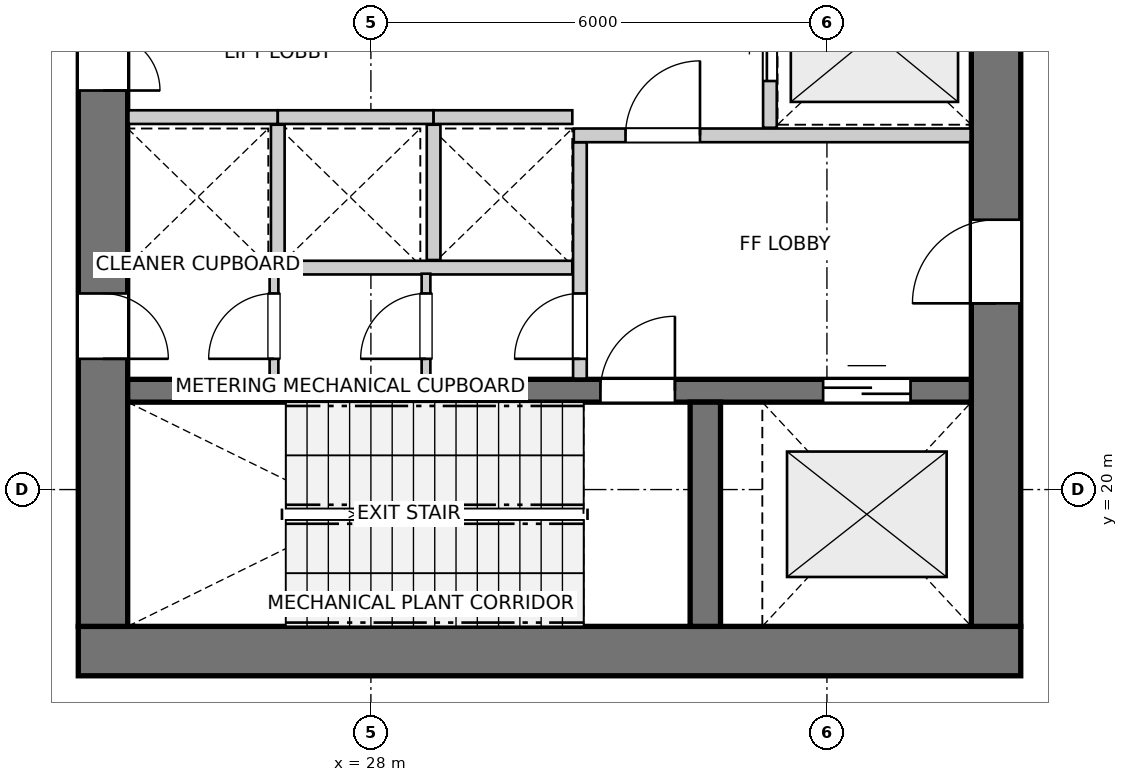
"""IFC4 building model, lengths in metres.
Left out: names, types, materials, properties, quantities, classifications, styles, units other than length and angle.
Written with IfcOpenShell. Run it as: python <this file> out.ifc"""

import sys

from ifc_helpers import new_model, si_unit, direction, frame, frame_2d, origin, place, context, subcontext, project, spatial, rectangle, extrude, source, transform, mapped, element, fill, save


model = new_model("IFC4")
c1 = context("Model", 3, precision=1e-05, world=origin(), true_north=direction((0.0, 1.0)))
c2 = subcontext(c1, "Body", "Model", "MODEL_VIEW")
j1 = project(units=[si_unit("LENGTHUNIT", "METRE"), si_unit("PLANEANGLEUNIT", "RADIAN")], contexts=[c1])
p1 = place(None, origin())
s1 = spatial("IfcSite", under=j1, at=p1, CompositionType="ELEMENT")
p2 = place(p1, origin())
s2 = spatial("IfcBuilding", under=s1, at=p2, CompositionType="ELEMENT")
p3 = place(p2, frame((0.0, 0.0, 128.0)))
s3 = spatial("IfcBuildingStorey", under=s2, at=p3, CompositionType="ELEMENT", Elevation=128.0)
p4 = place(p3, frame((24.15, 17.875, 0.0), z_axis=(0.0, 0.0, 1.0), x_axis=(1.0, 0.0, 0.0)))
e1 = element("IfcWall", 1, at=p4, inside=s3, PredefinedType="SHEAR", context=c2, shape_type="SweptSolid", body=[
    extrude(rectangle(XDim=12.4, YDim=0.65, at=frame_2d((6.2, 0.0))), origin(), (0.0, 0.0, 1.0), 4.75),
])
p5 = place(p3, frame((24.475, 33.8, 0.0), z_axis=(0.0, 0.0, 1.0), x_axis=(0.0, -1.0, 0.0)))
e2 = element("IfcWall", 2, at=p5, inside=s3, PredefinedType="SHEAR", context=c2, shape_type="SweptSolid", body=[
    extrude(rectangle(XDim=15.6, YDim=0.65, at=frame_2d((7.8, 0.0))), origin(), (0.0, 0.0, 1.0), 4.75),
])
p6 = place(p5, frame((7.05, 0.0, 0.0)))
e3 = element("IfcOpeningElement", 3, at=p6, cuts=e2, PredefinedType="OPENING", context=c2, shape_type="SweptSolid", body=[
    extrude(rectangle(XDim=1.5, YDim=2.15, at=frame_2d((0.75, 1.075))), frame((0.0, 0.335, 0.0), z_axis=(0.0, -1.0, 0.0), x_axis=(1.0, 0.0, 0.0)), (0.0, 0.0, 1.0), 0.67),
])
p7 = place(p5, frame((3.52, 0.0, 0.0)))
e4 = element("IfcOpeningElement", 4, at=p7, cuts=e2, PredefinedType="OPENING", context=c2, shape_type="SweptSolid", body=[
    extrude(rectangle(XDim=0.86, YDim=2.05, at=frame_2d((0.43, 1.025))), frame((0.0, 0.335, 0.0), z_axis=(0.0, -1.0, 0.0), x_axis=(1.0, 0.0, 0.0)), (0.0, 0.0, 1.0), 0.67),
])
p8 = place(p5, frame((11.22, 0.0, 0.0)))
e5 = element("IfcOpeningElement", 5, at=p8, cuts=e2, PredefinedType="OPENING", context=c2, shape_type="SweptSolid", body=[
    extrude(rectangle(XDim=0.86, YDim=2.05, at=frame_2d((0.43, 1.025))), frame((0.0, 0.335, 0.0), z_axis=(0.0, -1.0, 0.0), x_axis=(1.0, 0.0, 0.0)), (0.0, 0.0, 1.0), 0.67),
])
p9 = place(p3, frame((36.225, 18.2, 0.0), z_axis=(0.0, 0.0, 1.0), x_axis=(0.0, 1.0, 0.0)))
e6 = element("IfcWall", 6, at=p9, inside=s3, PredefinedType="SHEAR", context=c2, shape_type="SweptSolid", body=[
    extrude(rectangle(XDim=15.6, YDim=0.65, at=frame_2d((7.8, 0.0))), origin(), (0.0, 0.0, 1.0), 4.75),
])
p10 = place(p9, frame((4.25, 0.0, 0.0)))
e7 = element("IfcOpeningElement", 7, at=p10, cuts=e6, PredefinedType="OPENING", context=c2, shape_type="SweptSolid", body=[
    extrude(rectangle(XDim=1.1, YDim=2.15, at=frame_2d((0.55, 1.075))), frame((0.0, 0.335, 0.0), z_axis=(0.0, -1.0, 0.0), x_axis=(1.0, 0.0, 0.0)), (0.0, 0.0, 1.0), 0.67),
])
p11 = place(p9, frame((10.25, 0.0, 0.0)))
e8 = element("IfcOpeningElement", 8, at=p11, cuts=e6, PredefinedType="OPENING", context=c2, shape_type="SweptSolid", body=[
    extrude(rectangle(XDim=1.1, YDim=2.15, at=frame_2d((0.55, 1.075))), frame((0.0, 0.335, 0.0), z_axis=(0.0, -1.0, 0.0), x_axis=(1.0, 0.0, 0.0)), (0.0, 0.0, 1.0), 0.67),
])
p12 = place(p3, frame((24.8, 21.3, 0.0), z_axis=(0.0, 0.0, 1.0), x_axis=(1.0, 0.0, 0.0)))
e9 = element("IfcWall", 9, at=p12, inside=s3, PredefinedType="SHEAR", context=c2, shape_type="SweptSolid", body=[
    extrude(rectangle(XDim=11.1, YDim=0.3, at=frame_2d((5.55, 0.0))), origin(), (0.0, 0.0, 1.0), 4.75),
])
p13 = place(p12, frame((6.22, 0.0, 0.0)))
e10 = element("IfcOpeningElement", 10, at=p13, cuts=e9, PredefinedType="OPENING", context=c2, shape_type="SweptSolid", body=[
    extrude(rectangle(XDim=0.98, YDim=2.15, at=frame_2d((0.49, 1.075))), frame((0.0, 0.16, 0.0), z_axis=(0.0, -1.0, 0.0), x_axis=(1.0, 0.0, 0.0)), (0.0, 0.0, 1.0), 0.32),
])
p14 = place(p12, frame((9.15, 0.0, 0.0)))
e11 = element("IfcOpeningElement", 11, at=p14, cuts=e9, PredefinedType="OPENING", context=c2, shape_type="SweptSolid", body=[
    extrude(rectangle(XDim=1.15, YDim=2.15, at=frame_2d((0.575, 1.075))), frame((0.0, 0.16, 0.0), z_axis=(0.0, -1.0, 0.0), x_axis=(1.0, 0.0, 0.0)), (0.0, 0.0, 1.0), 0.32),
])
p15 = place(p3, frame((32.4, 18.2, 0.0), z_axis=(0.0, 0.0, 1.0), x_axis=(0.0, 1.0, 0.0)))
e12 = element("IfcWall", 12, at=p15, inside=s3, PredefinedType="SHEAR", context=c2, shape_type="SweptSolid", body=[
    extrude(rectangle(XDim=2.95, YDim=0.4, at=frame_2d((1.475, 0.0))), origin(), (0.0, 0.0, 1.0), 4.75),
])
p16 = place(p3, frame((30.75, 21.46, 0.0), z_axis=(0.0, 0.0, 1.0), x_axis=(0.0, 1.0, 0.0)))
e13 = element("IfcWall", 13, at=p16, inside=s3, PredefinedType="PARTITIONING", context=c2, shape_type="SweptSolid", body=[
    extrude(rectangle(XDim=3.11, YDim=0.18, at=frame_2d((1.555, 0.0))), origin(), (0.0, 0.0, 1.0), 4.75),
])
p17 = place(p16, frame((0.26, 0.0, 0.0)))
e14 = element("IfcOpeningElement", 14, at=p17, cuts=e13, PredefinedType="OPENING", context=c2, shape_type="SweptSolid", body=[
    extrude(rectangle(XDim=0.86, YDim=2.05, at=frame_2d((0.43, 1.025))), frame((0.0, 0.1, 0.0), z_axis=(0.0, -1.0, 0.0), x_axis=(1.0, 0.0, 0.0)), (0.0, 0.0, 1.0), 0.2),
])
p18 = place(p3, frame((30.67, 24.66, 0.0), z_axis=(0.0, 0.0, 1.0), x_axis=(1.0, 0.0, 0.0)))
e15 = element("IfcWall", 15, at=p18, inside=s3, PredefinedType="PARTITIONING", context=c2, shape_type="SweptSolid", body=[
    extrude(rectangle(XDim=5.22, YDim=0.18, at=frame_2d((2.61, 0.0))), origin(), (0.0, 0.0, 1.0), 4.75),
])
p19 = place(p18, frame((0.68, 0.0, 0.0)))
e16 = element("IfcOpeningElement", 16, at=p19, cuts=e15, PredefinedType="OPENING", context=c2, shape_type="SweptSolid", body=[
    extrude(rectangle(XDim=0.98, YDim=2.15, at=frame_2d((0.49, 1.075))), frame((0.0, 0.1, 0.0), z_axis=(0.0, -1.0, 0.0), x_axis=(1.0, 0.0, 0.0)), (0.0, 0.0, 1.0), 0.2),
])
p20 = place(p3, frame((33.25, 24.76, 0.0), z_axis=(0.0, 0.0, 1.0), x_axis=(0.0, 1.0, 0.0)))
e17 = element("IfcWall", 17, at=p20, inside=s3, PredefinedType="PARTITIONING", context=c2, shape_type="SweptSolid", body=[
    extrude(rectangle(XDim=2.48, YDim=0.18, at=frame_2d((1.24, 0.0))), origin(), (0.0, 0.0, 1.0), 4.75),
])
p21 = place(p20, frame((0.615, 0.0, 0.0)))
e18 = element("IfcOpeningElement", 18, at=p21, cuts=e17, PredefinedType="OPENING", context=c2, shape_type="SweptSolid", body=[
    extrude(rectangle(XDim=1.25, YDim=2.15, at=frame_2d((0.625, 1.075))), frame((0.0, 0.1, 0.0), z_axis=(0.0, -1.0, 0.0), x_axis=(1.0, 0.0, 0.0)), (0.0, 0.0, 1.0), 0.2),
])
p22 = place(p3, frame((24.81, 22.92, 0.0), z_axis=(0.0, 0.0, 1.0), x_axis=(1.0, 0.0, 0.0)))
e19 = element("IfcWall", 19, at=p22, inside=s3, PredefinedType="PARTITIONING", context=c2, shape_type="SweptSolid", body=[
    extrude(rectangle(XDim=5.84, YDim=0.18, at=frame_2d((2.92, 0.0))), origin(), (0.0, 0.0, 1.0), 4.75),
])
p23 = place(p3, frame((24.81, 24.9, 0.0), z_axis=(0.0, 0.0, 1.0), x_axis=(1.0, 0.0, 0.0)))
e20 = element("IfcWall", 20, at=p23, inside=s3, PredefinedType="PARTITIONING", context=c2, shape_type="SweptSolid", body=[
    extrude(rectangle(XDim=1.965, YDim=0.18, at=frame_2d((0.982, 0.0))), origin(), (0.0, 0.0, 1.0), 4.75),
])
p24 = place(p3, frame((26.775, 24.9, 0.0), z_axis=(0.0, 0.0, 1.0), x_axis=(1.0, 0.0, 0.0)))
e21 = element("IfcWall", 21, at=p24, inside=s3, PredefinedType="PARTITIONING", context=c2, shape_type="SweptSolid", body=[
    extrude(rectangle(XDim=2.05, YDim=0.18, at=frame_2d((1.025, 0.0))), origin(), (0.0, 0.0, 1.0), 4.75),
])
p25 = place(p3, frame((26.775, 23.02, 0.0), z_axis=(0.0, 0.0, 1.0), x_axis=(0.0, 1.0, 0.0)))
e22 = element("IfcWall", 22, at=p25, inside=s3, PredefinedType="PARTITIONING", context=c2, shape_type="SweptSolid", body=[
    extrude(rectangle(XDim=1.78, YDim=0.18, at=frame_2d((0.89, 0.0))), origin(), (0.0, 0.0, 1.0), 4.75),
])
p26 = place(p3, frame((28.825, 24.9, 0.0), z_axis=(0.0, 0.0, 1.0), x_axis=(1.0, 0.0, 0.0)))
e23 = element("IfcWall", 23, at=p26, inside=s3, PredefinedType="PARTITIONING", context=c2, shape_type="SweptSolid", body=[
    extrude(rectangle(XDim=1.825, YDim=0.18, at=frame_2d((0.913, 0.0))), origin(), (0.0, 0.0, 1.0), 4.75),
])
p27 = place(p3, frame((28.825, 23.02, 0.0), z_axis=(0.0, 0.0, 1.0), x_axis=(0.0, 1.0, 0.0)))
e24 = element("IfcWall", 24, at=p27, inside=s3, PredefinedType="PARTITIONING", context=c2, shape_type="SweptSolid", body=[
    extrude(rectangle(XDim=1.78, YDim=0.18, at=frame_2d((0.89, 0.0))), origin(), (0.0, 0.0, 1.0), 4.75),
])
p28 = place(p3, frame((26.725, 21.46, 0.0), z_axis=(0.0, 0.0, 1.0), x_axis=(0.0, 1.0, 0.0)))
e25 = element("IfcWall", 25, at=p28, inside=s3, PredefinedType="PARTITIONING", context=c2, shape_type="SweptSolid", body=[
    extrude(rectangle(XDim=1.38, YDim=0.115, at=frame_2d((0.69, 0.0))), origin(), (0.0, 0.0, 1.0), 4.75),
])
p29 = place(p28, frame((0.26, 0.0, 0.0)))
e26 = element("IfcOpeningElement", 26, at=p29, cuts=e25, PredefinedType="OPENING", context=c2, shape_type="SweptSolid", body=[
    extrude(rectangle(XDim=0.86, YDim=2.05, at=frame_2d((0.43, 1.025))), frame((0.0, 0.067, 0.0), z_axis=(0.0, -1.0, 0.0), x_axis=(1.0, 0.0, 0.0)), (0.0, 0.0, 1.0), 0.135),
])
p30 = place(p3, frame((28.725, 21.46, 0.0), z_axis=(0.0, 0.0, 1.0), x_axis=(0.0, 1.0, 0.0)))
e27 = element("IfcWall", 27, at=p30, inside=s3, PredefinedType="PARTITIONING", context=c2, shape_type="SweptSolid", body=[
    extrude(rectangle(XDim=1.38, YDim=0.115, at=frame_2d((0.69, 0.0))), origin(), (0.0, 0.0, 1.0), 4.75),
])
p31 = place(p30, frame((0.26, 0.0, 0.0)))
e28 = element("IfcOpeningElement", 28, at=p31, cuts=e27, PredefinedType="OPENING", context=c2, shape_type="SweptSolid", body=[
    extrude(rectangle(XDim=0.86, YDim=2.05, at=frame_2d((0.43, 1.025))), frame((0.0, 0.067, 0.0), z_axis=(0.0, -1.0, 0.0), x_axis=(1.0, 0.0, 0.0)), (0.0, 0.0, 1.0), 0.135),
])
m1 = source(origin(), c2, "Body", "SweptSolid", [
    extrude(rectangle(XDim=0.98, YDim=2.15, at=frame_2d((0.49, 1.075))), frame((0.0, 0.025, 0.0), z_axis=(0.0, -1.0, 0.0), x_axis=(1.0, 0.0, 0.0)), (0.0, 0.0, 1.0), 0.05),
])
p32 = place(p13, origin())
e29 = element("IfcDoor", 29, at=p32, inside=s3, OperationType="SINGLE_SWING_RIGHT", PredefinedType="DOOR", context=c2, shape_type="MappedRepresentation", body=[
    mapped(m1, transform((0.0, 0.0, 0.0), x_axis=(1.0, 0.0, 0.0), y_axis=(0.0, 1.0, 0.0), z_axis=(0.0, 0.0, 1.0), scale=1.0)),
])
fill(e10, e29)
m2 = source(origin(), c2, "Body", "SweptSolid", [
    extrude(rectangle(XDim=1.15, YDim=2.15, at=frame_2d((0.575, 1.075))), frame((0.0, 0.025, 0.0), z_axis=(0.0, -1.0, 0.0), x_axis=(1.0, 0.0, 0.0)), (0.0, 0.0, 1.0), 0.05),
])
p33 = place(p14, origin())
e30 = element("IfcDoor", 30, at=p33, inside=s3, OperationType="DOUBLE_DOOR_SLIDING", PredefinedType="DOOR", context=c2, shape_type="MappedRepresentation", body=[
    mapped(m2, transform((0.0, 0.0, 0.0), x_axis=(1.0, 0.0, 0.0), y_axis=(0.0, 1.0, 0.0), z_axis=(0.0, 0.0, 1.0), scale=1.0)),
])
fill(e11, e30)
m3 = source(origin(), c2, "Body", "SweptSolid", [
    extrude(rectangle(XDim=1.1, YDim=2.15, at=frame_2d((0.55, 1.075))), frame((0.0, 0.025, 0.0), z_axis=(0.0, -1.0, 0.0), x_axis=(1.0, 0.0, 0.0)), (0.0, 0.0, 1.0), 0.05),
])
p34 = place(p10, origin())
e31 = element("IfcDoor", 31, at=p34, inside=s3, OperationType="SINGLE_SWING_LEFT", PredefinedType="DOOR", context=c2, shape_type="MappedRepresentation", body=[
    mapped(m3, transform((0.0, 0.0, 0.0), x_axis=(1.0, 0.0, 0.0), y_axis=(0.0, 1.0, 0.0), z_axis=(0.0, 0.0, 1.0), scale=1.0)),
])
fill(e7, e31)
m4 = source(origin(), c2, "Body", "SweptSolid", [
    extrude(rectangle(XDim=1.5, YDim=2.15, at=frame_2d((0.75, 1.075))), frame((0.0, 0.025, 0.0), z_axis=(0.0, -1.0, 0.0), x_axis=(1.0, 0.0, 0.0)), (0.0, 0.0, 1.0), 0.05),
])
p35 = place(p6, origin())
e32 = element("IfcDoor", 32, at=p35, inside=s3, OperationType="DOUBLE_DOOR_SINGLE_SWING", PredefinedType="DOOR", context=c2, shape_type="MappedRepresentation", body=[
    mapped(m4, transform((0.0, 0.0, 0.0), x_axis=(1.0, 0.0, 0.0), y_axis=(0.0, 1.0, 0.0), z_axis=(0.0, 0.0, 1.0), scale=1.0)),
])
fill(e3, e32)
m5 = source(origin(), c2, "Body", "SweptSolid", [
    extrude(rectangle(XDim=0.86, YDim=2.05, at=frame_2d((0.43, 1.025))), frame((0.0, 0.025, 0.0), z_axis=(0.0, -1.0, 0.0), x_axis=(1.0, 0.0, 0.0)), (0.0, 0.0, 1.0), 0.05),
])
p36 = place(p8, origin())
e33 = element("IfcDoor", 33, at=p36, inside=s3, OperationType="SINGLE_SWING_RIGHT", PredefinedType="DOOR", context=c2, shape_type="MappedRepresentation", body=[
    mapped(m5, transform((0.0, 0.0, 0.0), x_axis=(1.0, 0.0, 0.0), y_axis=(0.0, 1.0, 0.0), z_axis=(0.0, 0.0, 1.0), scale=1.0)),
])
fill(e5, e33)
p37 = place(p17, origin())
e34 = element("IfcDoor", 34, at=p37, inside=s3, OperationType="SINGLE_SWING_LEFT", PredefinedType="DOOR", context=c2, shape_type="MappedRepresentation", body=[
    mapped(m5, transform((0.0, 0.0, 0.0), x_axis=(1.0, 0.0, 0.0), y_axis=(0.0, 1.0, 0.0), z_axis=(0.0, 0.0, 1.0), scale=1.0)),
])
fill(e14, e34)
p38 = place(p19, origin())
e35 = element("IfcDoor", 35, at=p38, inside=s3, OperationType="SINGLE_SWING_RIGHT", PredefinedType="DOOR", context=c2, shape_type="MappedRepresentation", body=[
    mapped(m1, transform((0.0, 0.0, 0.0), x_axis=(1.0, 0.0, 0.0), y_axis=(0.0, 1.0, 0.0), z_axis=(0.0, 0.0, 1.0), scale=1.0)),
])
fill(e16, e35)
m6 = source(origin(), c2, "Body", "SweptSolid", [
    extrude(rectangle(XDim=1.25, YDim=2.15, at=frame_2d((0.625, 1.075))), frame((0.0, 0.025, 0.0), z_axis=(0.0, -1.0, 0.0), x_axis=(1.0, 0.0, 0.0)), (0.0, 0.0, 1.0), 0.05),
])
p39 = place(p21, origin())
e36 = element("IfcDoor", 36, at=p39, inside=s3, OperationType="DOUBLE_DOOR_SLIDING", PredefinedType="DOOR", context=c2, shape_type="MappedRepresentation", body=[
    mapped(m6, transform((0.0, 0.0, 0.0), x_axis=(1.0, 0.0, 0.0), y_axis=(0.0, 1.0, 0.0), z_axis=(0.0, 0.0, 1.0), scale=1.0)),
])
fill(e18, e36)
p40 = place(p29, origin())
e37 = element("IfcDoor", 37, at=p40, inside=s3, OperationType="SINGLE_SWING_LEFT", PredefinedType="DOOR", context=c2, shape_type="MappedRepresentation", body=[
    mapped(m5, transform((0.0, 0.0, 0.0), x_axis=(1.0, 0.0, 0.0), y_axis=(0.0, 1.0, 0.0), z_axis=(0.0, 0.0, 1.0), scale=1.0)),
])
fill(e26, e37)
p41 = place(p31, origin())
e38 = element("IfcDoor", 38, at=p41, inside=s3, OperationType="SINGLE_SWING_LEFT", PredefinedType="DOOR", context=c2, shape_type="MappedRepresentation", body=[
    mapped(m5, transform((0.0, 0.0, 0.0), x_axis=(1.0, 0.0, 0.0), y_axis=(0.0, 1.0, 0.0), z_axis=(0.0, 0.0, 1.0), scale=1.0)),
])
fill(e28, e38)
save(model, sys.argv[1])
